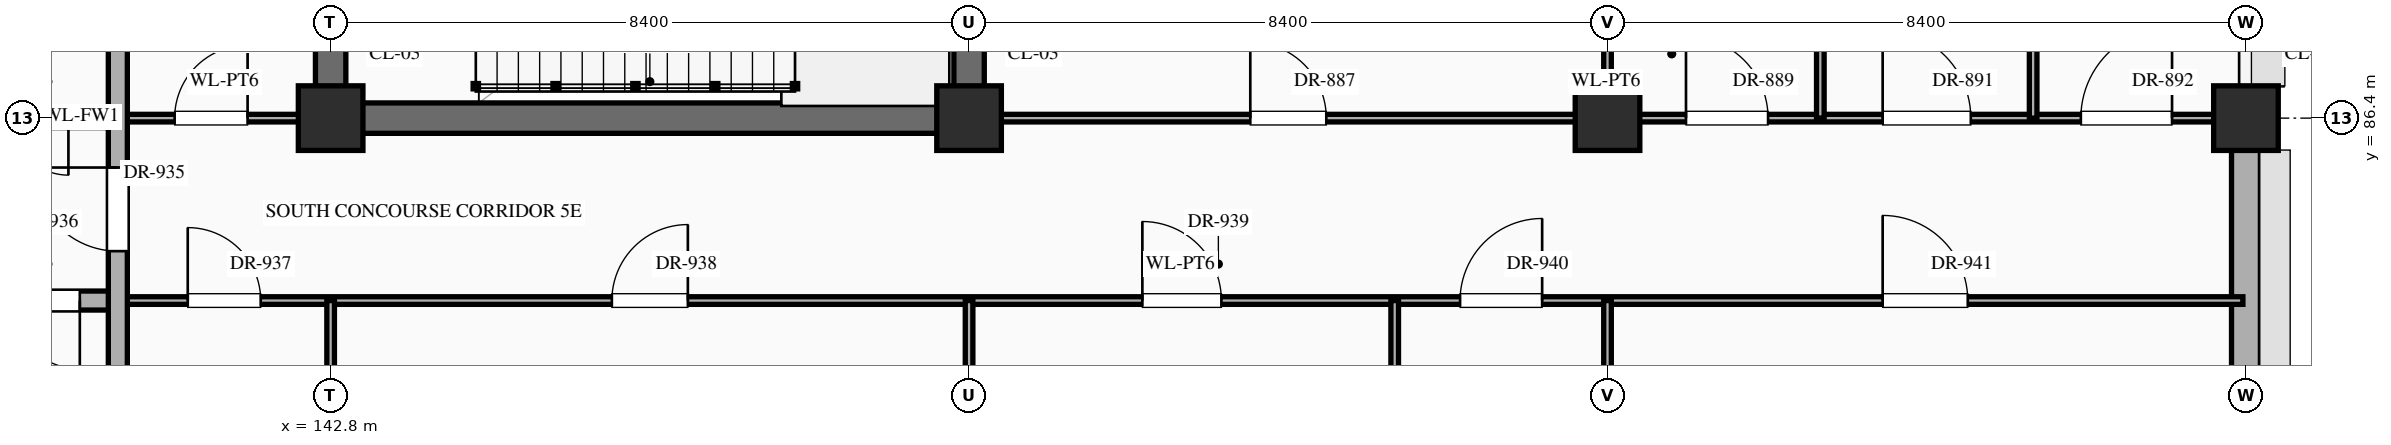
"""IFC4 building model, lengths in metres.
Left out: names, types, materials, properties, quantities, classifications, styles, units other than length and angle.
Written with IfcOpenShell. Run it as: python <this file> out.ifc"""

import sys

from ifc_helpers import new_model, si_unit, direction, frame, frame_2d, origin, origin_2d, place, context, subcontext, project, spatial, rectangle, extrude, element, fill, save


model = new_model("IFC4")
c1 = context("Model", 3, precision=1e-05, world=origin(), true_north=direction((0.0, 1.0)))
c2 = subcontext(c1, "Body", "Model", "MODEL_VIEW")
j1 = project(units=[si_unit("LENGTHUNIT", "METRE"), si_unit("PLANEANGLEUNIT", "RADIAN")], contexts=[c1])
p1 = place(None, origin())
s1 = spatial("IfcSite", under=j1, at=p1, CompositionType="ELEMENT")
p2 = place(p1, origin())
s2 = spatial("IfcBuilding", under=s1, at=p2, CompositionType="ELEMENT")
p3 = place(p2, origin())
s3 = spatial("IfcBuildingStorey", under=s2, at=p3, CompositionType="ELEMENT", Elevation=0.0)
for number, where, z_axis, x_axis in (
    (1, (142.8, 86.4, 0.0), (0.0, 0.0, 1.0), (1.0, 0.0, 0.0)),
    (2, (151.2, 86.4, 0.0), (0.0, 0.0, 1.0), (1.0, 0.0, 0.0)),
    (3, (159.6, 86.4, 0.0), (0.0, 0.0, 1.0), (1.0, 0.0, 0.0)),
    (4, (168.0, 86.4, 0.0), (0.0, 0.0, 1.0), (1.0, 0.0, 0.0)),
):
    element("IfcColumn", number, at=place(p3, frame(where, z_axis=z_axis, x_axis=x_axis)), inside=s3, PredefinedType="COLUMN", context=c2, shape_type="SweptSolid", body=[
        extrude(rectangle(XDim=0.85, YDim=0.85, at=origin_2d()), origin(), (0.0, 0.0, 1.0), 5.4),
    ])
p4 = place(p3, frame((168.0, 79.62, 0.0), z_axis=(0.0, 0.0, 1.0), x_axis=(0.0, 1.0, 0.0)))
e5 = element("IfcWall", 5, at=p4, inside=s3, PredefinedType="STANDARD", context=c2, shape_type="SweptSolid", body=[
    extrude(rectangle(XDim=6.36, YDim=0.38, at=frame_2d((3.18, 0.0))), origin(), (0.0, 0.0, 1.0), 4.47),
])
p5 = place(p4, frame((1.53, 0.0, 0.85)))
e6 = element("IfcOpeningElement", 6, at=p5, cuts=e5, PredefinedType="OPENING", context=c2, shape_type="SweptSolid", body=[
    extrude(rectangle(XDim=0.9, YDim=1.2, at=frame_2d((0.45, 0.6))), frame((0.0, 0.202, 0.0), z_axis=(0.0, -1.0, 0.0), x_axis=(1.0, 0.0, 0.0)), (0.0, 0.0, 1.0), 0.404),
])
p6 = place(p3, frame((137.2, 84.0, 0.0), z_axis=(0.0, 0.0, 1.0), x_axis=(1.0, 0.0, 0.0)))
e7 = element("IfcWall", 7, at=p6, inside=s3, PredefinedType="STANDARD", context=c2, shape_type="SweptSolid", body=[
    extrude(rectangle(XDim=2.8, YDim=0.25, at=frame_2d((1.4, 0.0))), origin(), (0.0, 0.0, 1.0), 5.12),
])
p7 = place(p6, frame((0.5, 0.0, 0.0)))
e8 = element("IfcOpeningElement", 8, at=p7, cuts=e7, PredefinedType="OPENING", context=c2, shape_type="SweptSolid", body=[
    extrude(rectangle(XDim=1.8, YDim=2.35, at=frame_2d((0.9, 1.175))), frame((0.0, 0.137, 0.0), z_axis=(0.0, -1.0, 0.0), x_axis=(1.0, 0.0, 0.0)), (0.0, 0.0, 1.0), 0.274),
])
p8 = place(p3, frame((140.0, 84.0, 0.0), z_axis=(0.0, 0.0, 1.0), x_axis=(1.0, 0.0, 0.0)))
e9 = element("IfcWall", 9, at=p8, inside=s3, PredefinedType="STANDARD", context=c2, shape_type="SweptSolid", body=[
    extrude(rectangle(XDim=27.96, YDim=0.1, at=frame_2d((13.98, 0.0))), origin(), (0.0, 0.0, 1.0), 5.12),
])
p9 = place(p8, frame((0.92, 0.0, 0.0)))
e10 = element("IfcOpeningElement", 10, at=p9, cuts=e9, PredefinedType="OPENING", context=c2, shape_type="SweptSolid", body=[
    extrude(rectangle(XDim=0.96, YDim=2.2, at=frame_2d((0.48, 1.1))), frame((0.0, 0.062, 0.0), z_axis=(0.0, -1.0, 0.0), x_axis=(1.0, 0.0, 0.0)), (0.0, 0.0, 1.0), 0.124),
])
p10 = place(p8, frame((6.5, 0.0, 0.0)))
e11 = element("IfcOpeningElement", 11, at=p10, cuts=e9, PredefinedType="OPENING", context=c2, shape_type="SweptSolid", body=[
    extrude(rectangle(XDim=1.0, YDim=2.25, at=frame_2d((0.5, 1.125))), frame((0.0, 0.062, 0.0), z_axis=(0.0, -1.0, 0.0), x_axis=(1.0, 0.0, 0.0)), (0.0, 0.0, 1.0), 0.124),
])
p11 = place(p8, frame((13.48, 0.0, 0.0)))
e12 = element("IfcOpeningElement", 12, at=p11, cuts=e9, PredefinedType="OPENING", context=c2, shape_type="SweptSolid", body=[
    extrude(rectangle(XDim=1.04, YDim=2.2, at=frame_2d((0.52, 1.1))), frame((0.0, 0.062, 0.0), z_axis=(0.0, -1.0, 0.0), x_axis=(1.0, 0.0, 0.0)), (0.0, 0.0, 1.0), 0.124),
])
p12 = place(p8, frame((17.66, 0.0, 0.0)))
e13 = element("IfcOpeningElement", 13, at=p12, cuts=e9, PredefinedType="OPENING", context=c2, shape_type="SweptSolid", body=[
    extrude(rectangle(XDim=1.08, YDim=2.25, at=frame_2d((0.54, 1.125))), frame((0.0, 0.062, 0.0), z_axis=(0.0, -1.0, 0.0), x_axis=(1.0, 0.0, 0.0)), (0.0, 0.0, 1.0), 0.124),
])
p13 = place(p8, frame((23.22, 0.0, 0.0)))
e14 = element("IfcOpeningElement", 14, at=p13, cuts=e9, PredefinedType="OPENING", context=c2, shape_type="SweptSolid", body=[
    extrude(rectangle(XDim=1.12, YDim=2.25, at=frame_2d((0.56, 1.125))), frame((0.0, 0.062, 0.0), z_axis=(0.0, -1.0, 0.0), x_axis=(1.0, 0.0, 0.0)), (0.0, 0.0, 1.0), 0.124),
])
p14 = place(p3, frame((137.2, 86.4, 0.0), z_axis=(0.0, 0.0, 1.0), x_axis=(1.0, 0.0, 0.0)))
e15 = element("IfcWall", 15, at=p14, inside=s3, PredefinedType="STANDARD", context=c2, shape_type="SweptSolid", body=[
    extrude(rectangle(XDim=2.8, YDim=0.25, at=frame_2d((1.4, 0.0))), origin(), (0.0, 0.0, 1.0), 4.27),
])
p15 = place(p14, frame((0.65, 0.0, 0.0)))
e16 = element("IfcOpeningElement", 16, at=p15, cuts=e15, PredefinedType="OPENING", context=c2, shape_type="SweptSolid", body=[
    extrude(rectangle(XDim=1.5, YDim=2.25, at=frame_2d((0.75, 1.125))), frame((0.0, 0.137, 0.0), z_axis=(0.0, -1.0, 0.0), x_axis=(1.0, 0.0, 0.0)), (0.0, 0.0, 1.0), 0.274),
])
p16 = place(p3, frame((140.0, 86.4, 0.0), z_axis=(0.0, 0.0, 1.0), x_axis=(1.0, 0.0, 0.0)))
e17 = element("IfcWall", 17, at=p16, inside=s3, PredefinedType="STANDARD", context=c2, shape_type="SweptSolid", body=[
    extrude(rectangle(XDim=2.8, YDim=0.1, at=frame_2d((1.4, 0.0))), origin(), (0.0, 0.0, 1.0), 4.27),
])
p17 = place(p16, frame((0.748, 0.0, 0.0)))
e18 = element("IfcOpeningElement", 18, at=p17, cuts=e17, PredefinedType="OPENING", context=c2, shape_type="SweptSolid", body=[
    extrude(rectangle(XDim=0.96, YDim=2.2, at=frame_2d((0.48, 1.1))), frame((0.0, 0.062, 0.0), z_axis=(0.0, -1.0, 0.0), x_axis=(1.0, 0.0, 0.0)), (0.0, 0.0, 1.0), 0.124),
])
p18 = place(p3, frame((142.8, 86.4, 0.0), z_axis=(0.0, 0.0, 1.0), x_axis=(1.0, 0.0, 0.0)))
e19 = element("IfcWall", 19, at=p18, inside=s3, PredefinedType="SHEAR", context=c2, shape_type="SweptSolid", body=[
    extrude(rectangle(XDim=8.4, YDim=0.4, at=frame_2d((4.2, 0.0))), origin(), (0.0, 0.0, 1.0), 5.12),
])
p19 = place(p3, frame((151.2, 86.4, 0.0), z_axis=(0.0, 0.0, 1.0), x_axis=(1.0, 0.0, 0.0)))
e20 = element("IfcWall", 20, at=p19, inside=s3, PredefinedType="STANDARD", context=c2, shape_type="SweptSolid", body=[
    extrude(rectangle(XDim=16.76, YDim=0.1, at=frame_2d((8.38, 0.0))), origin(), (0.0, 0.0, 1.0), 4.27),
])
p20 = place(p19, frame((3.7, 0.0, 0.0)))
e21 = element("IfcOpeningElement", 21, at=p20, cuts=e20, PredefinedType="OPENING", context=c2, shape_type="SweptSolid", body=[
    extrude(rectangle(XDim=1.0, YDim=2.25, at=frame_2d((0.5, 1.125))), frame((0.0, 0.062, 0.0), z_axis=(0.0, -1.0, 0.0), x_axis=(1.0, 0.0, 0.0)), (0.0, 0.0, 1.0), 0.124),
])
p21 = place(p19, frame((9.433, 0.0, 0.0)))
e22 = element("IfcOpeningElement", 22, at=p21, cuts=e20, PredefinedType="OPENING", context=c2, shape_type="SweptSolid", body=[
    extrude(rectangle(XDim=1.08, YDim=2.25, at=frame_2d((0.54, 1.125))), frame((0.0, 0.062, 0.0), z_axis=(0.0, -1.0, 0.0), x_axis=(1.0, 0.0, 0.0)), (0.0, 0.0, 1.0), 0.124),
])
p22 = place(p19, frame((12.02, 0.0, 0.0)))
e23 = element("IfcOpeningElement", 23, at=p22, cuts=e20, PredefinedType="OPENING", context=c2, shape_type="SweptSolid", body=[
    extrude(rectangle(XDim=1.16, YDim=2.3, at=frame_2d((0.58, 1.15))), frame((0.0, 0.062, 0.0), z_axis=(0.0, -1.0, 0.0), x_axis=(1.0, 0.0, 0.0)), (0.0, 0.0, 1.0), 0.124),
])
p23 = place(p19, frame((14.627, 0.0, 0.0)))
e24 = element("IfcOpeningElement", 24, at=p23, cuts=e20, PredefinedType="OPENING", context=c2, shape_type="SweptSolid", body=[
    extrude(rectangle(XDim=1.2, YDim=2.35, at=frame_2d((0.6, 1.175))), frame((0.0, 0.062, 0.0), z_axis=(0.0, -1.0, 0.0), x_axis=(1.0, 0.0, 0.0)), (0.0, 0.0, 1.0), 0.124),
])
p24 = place(p3, frame((140.0, 79.24, 0.0), z_axis=(0.0, 0.0, 1.0), x_axis=(0.0, 1.0, 0.0)))
e25 = element("IfcWall", 25, at=p24, inside=s3, PredefinedType="STANDARD", context=c2, shape_type="SweptSolid", body=[
    extrude(rectangle(XDim=14.36, YDim=0.25, at=frame_2d((7.18, 0.0))), origin(), (0.0, 0.0, 1.0), 5.12),
])
p25 = place(p24, frame((12.61, 0.0, 0.0)))
e26 = element("IfcOpeningElement", 26, at=p25, cuts=e25, PredefinedType="OPENING", context=c2, shape_type="SweptSolid", body=[
    extrude(rectangle(XDim=1.1, YDim=2.2, at=frame_2d((0.55, 1.1))), frame((0.0, 0.137, 0.0), z_axis=(0.0, -1.0, 0.0), x_axis=(1.0, 0.0, 0.0)), (0.0, 0.0, 1.0), 0.274),
])
p26 = place(p24, frame((5.41, 0.0, 0.0)))
e27 = element("IfcOpeningElement", 27, at=p26, cuts=e25, PredefinedType="OPENING", context=c2, shape_type="SweptSolid", body=[
    extrude(rectangle(XDim=1.1, YDim=2.2, at=frame_2d((0.55, 1.1))), frame((0.0, 0.137, 0.0), z_axis=(0.0, -1.0, 0.0), x_axis=(1.0, 0.0, 0.0)), (0.0, 0.0, 1.0), 0.274),
])
p27 = place(p3, frame((142.8, 79.24, 0.0), z_axis=(0.0, 0.0, 1.0), x_axis=(0.0, 1.0, 0.0)))
e28 = element("IfcWall", 28, at=p27, inside=s3, PredefinedType="STANDARD", context=c2, shape_type="SweptSolid", body=[
    extrude(rectangle(XDim=4.76, YDim=0.1, at=frame_2d((2.38, 0.0))), origin(), (0.0, 0.0, 1.0), 4.37),
])
p28 = place(p3, frame((142.8, 86.4, 0.0), z_axis=(0.0, 0.0, 1.0), x_axis=(0.0, 1.0, 0.0)))
e29 = element("IfcWall", 29, at=p28, inside=s3, PredefinedType="SHEAR", context=c2, shape_type="SweptSolid", body=[
    extrude(rectangle(XDim=4.8, YDim=0.4, at=frame_2d((2.4, 0.0))), origin(), (0.0, 0.0, 1.0), 5.12),
])
p29 = place(p3, frame((151.2, 79.24, 0.0), z_axis=(0.0, 0.0, 1.0), x_axis=(0.0, 1.0, 0.0)))
e30 = element("IfcWall", 30, at=p29, inside=s3, PredefinedType="STANDARD", context=c2, shape_type="SweptSolid", body=[
    extrude(rectangle(XDim=4.76, YDim=0.1, at=frame_2d((2.38, 0.0))), origin(), (0.0, 0.0, 1.0), 4.37),
])
p30 = place(p3, frame((151.2, 86.4, 0.0), z_axis=(0.0, 0.0, 1.0), x_axis=(0.0, 1.0, 0.0)))
e31 = element("IfcWall", 31, at=p30, inside=s3, PredefinedType="SHEAR", context=c2, shape_type="SweptSolid", body=[
    extrude(rectangle(XDim=4.8, YDim=0.4, at=frame_2d((2.4, 0.0))), origin(), (0.0, 0.0, 1.0), 5.12),
])
p31 = place(p3, frame((156.8, 57.6, 0.0), z_axis=(0.0, 0.0, 1.0), x_axis=(0.0, 1.0, 0.0)))
e32 = element("IfcWall", 32, at=p31, inside=s3, PredefinedType="STANDARD", context=c2, shape_type="SweptSolid", body=[
    extrude(rectangle(XDim=26.4, YDim=0.1, at=frame_2d((13.2, 0.0))), origin(), (0.0, 0.0, 1.0), 5.12),
])
p32 = place(p31, frame((23.38, 0.0, 0.0)))
e33 = element("IfcOpeningElement", 33, at=p32, cuts=e32, PredefinedType="OPENING", context=c2, shape_type="SweptSolid", body=[
    extrude(rectangle(XDim=1.24, YDim=2.3, at=frame_2d((0.62, 1.15))), frame((0.0, 0.062, 0.0), z_axis=(0.0, -1.0, 0.0), x_axis=(1.0, 0.0, 0.0)), (0.0, 0.0, 1.0), 0.124),
])
p33 = place(p31, frame((3.07, 0.0, 0.0)))
e34 = element("IfcOpeningElement", 34, at=p33, cuts=e32, PredefinedType="OPENING", context=c2, shape_type="SweptSolid", body=[
    extrude(rectangle(XDim=1.06, YDim=2.4, at=frame_2d((0.53, 1.2))), frame((0.0, 0.062, 0.0), z_axis=(0.0, -1.0, 0.0), x_axis=(1.0, 0.0, 0.0)), (0.0, 0.0, 1.0), 0.124),
])
p34 = place(p31, frame((10.23, 0.0, 0.0)))
e35 = element("IfcOpeningElement", 35, at=p34, cuts=e32, PredefinedType="OPENING", context=c2, shape_type="SweptSolid", body=[
    extrude(rectangle(XDim=1.14, YDim=2.4, at=frame_2d((0.57, 1.2))), frame((0.0, 0.062, 0.0), z_axis=(0.0, -1.0, 0.0), x_axis=(1.0, 0.0, 0.0)), (0.0, 0.0, 1.0), 0.124),
])
p35 = place(p31, frame((17.55, 0.0, 0.0)))
e36 = element("IfcOpeningElement", 36, at=p35, cuts=e32, PredefinedType="OPENING", context=c2, shape_type="SweptSolid", body=[
    extrude(rectangle(XDim=0.9, YDim=2.15, at=frame_2d((0.45, 1.075))), frame((0.0, 0.062, 0.0), z_axis=(0.0, -1.0, 0.0), x_axis=(1.0, 0.0, 0.0)), (0.0, 0.0, 1.0), 0.124),
])
p36 = place(p3, frame((159.6, 43.2, 0.0), z_axis=(0.0, 0.0, 1.0), x_axis=(0.0, 1.0, 0.0)))
e37 = element("IfcWall", 37, at=p36, inside=s3, PredefinedType="STANDARD", context=c2, shape_type="SweptSolid", body=[
    extrude(rectangle(XDim=40.8, YDim=0.1, at=frame_2d((20.4, 0.0))), origin(), (0.0, 0.0, 1.0), 4.37),
])
p37 = place(p36, frame((37.933, 0.0, 0.0)))
e38 = element("IfcOpeningElement", 38, at=p37, cuts=e37, PredefinedType="OPENING", context=c2, shape_type="SweptSolid", body=[
    extrude(rectangle(XDim=1.28, YDim=2.35, at=frame_2d((0.64, 1.175))), frame((0.0, 0.062, 0.0), z_axis=(0.0, -1.0, 0.0), x_axis=(1.0, 0.0, 0.0)), (0.0, 0.0, 1.0), 0.124),
])
p38 = place(p36, frame((0.942, 0.0, 0.0)))
e39 = element("IfcOpeningElement", 39, at=p38, cuts=e37, PredefinedType="OPENING", context=c2, shape_type="SweptSolid", body=[
    extrude(rectangle(XDim=0.86, YDim=2.1, at=frame_2d((0.43, 1.05))), frame((0.0, 0.062, 0.0), z_axis=(0.0, -1.0, 0.0), x_axis=(1.0, 0.0, 0.0)), (0.0, 0.0, 1.0), 0.124),
])
p39 = place(p36, frame((4.167, 0.0, 0.0)))
e40 = element("IfcOpeningElement", 40, at=p39, cuts=e37, PredefinedType="OPENING", context=c2, shape_type="SweptSolid", body=[
    extrude(rectangle(XDim=0.92, YDim=2.15, at=frame_2d((0.46, 1.075))), frame((0.0, 0.062, 0.0), z_axis=(0.0, -1.0, 0.0), x_axis=(1.0, 0.0, 0.0)), (0.0, 0.0, 1.0), 0.124),
])
p40 = place(p36, frame((10.32, 0.0, 0.0)))
e41 = element("IfcOpeningElement", 41, at=p40, cuts=e37, PredefinedType="OPENING", context=c2, shape_type="SweptSolid", body=[
    extrude(rectangle(XDim=0.96, YDim=2.2, at=frame_2d((0.48, 1.1))), frame((0.0, 0.062, 0.0), z_axis=(0.0, -1.0, 0.0), x_axis=(1.0, 0.0, 0.0)), (0.0, 0.0, 1.0), 0.124),
])
p41 = place(p36, frame((17.5, 0.0, 0.0)))
e42 = element("IfcOpeningElement", 42, at=p41, cuts=e37, PredefinedType="OPENING", context=c2, shape_type="SweptSolid", body=[
    extrude(rectangle(XDim=1.0, YDim=2.25, at=frame_2d((0.5, 1.125))), frame((0.0, 0.062, 0.0), z_axis=(0.0, -1.0, 0.0), x_axis=(1.0, 0.0, 0.0)), (0.0, 0.0, 1.0), 0.124),
])
p42 = place(p36, frame((24.68, 0.0, 0.0)))
e43 = element("IfcOpeningElement", 43, at=p42, cuts=e37, PredefinedType="OPENING", context=c2, shape_type="SweptSolid", body=[
    extrude(rectangle(XDim=1.04, YDim=2.2, at=frame_2d((0.52, 1.1))), frame((0.0, 0.062, 0.0), z_axis=(0.0, -1.0, 0.0), x_axis=(1.0, 0.0, 0.0)), (0.0, 0.0, 1.0), 0.124),
])
p43 = place(p36, frame((31.86, 0.0, 0.0)))
e44 = element("IfcOpeningElement", 44, at=p43, cuts=e37, PredefinedType="OPENING", context=c2, shape_type="SweptSolid", body=[
    extrude(rectangle(XDim=1.08, YDim=2.25, at=frame_2d((0.54, 1.125))), frame((0.0, 0.062, 0.0), z_axis=(0.0, -1.0, 0.0), x_axis=(1.0, 0.0, 0.0)), (0.0, 0.0, 1.0), 0.124),
])
p44 = place(p3, frame((159.6, 86.4, 0.0), z_axis=(0.0, 0.0, 1.0), x_axis=(0.0, 1.0, 0.0)))
e45 = element("IfcWall", 45, at=p44, inside=s3, PredefinedType="STANDARD", context=c2, shape_type="SweptSolid", body=[
    extrude(rectangle(XDim=7.2, YDim=0.1, at=frame_2d((3.6, 0.0))), origin(), (0.0, 0.0, 1.0), 4.37),
])
p45 = place(p3, frame((162.4, 86.4, 0.0), z_axis=(0.0, 0.0, 1.0), x_axis=(0.0, 1.0, 0.0)))
e46 = element("IfcWall", 46, at=p45, inside=s3, PredefinedType="STANDARD", context=c2, shape_type="SweptSolid", body=[
    extrude(rectangle(XDim=7.2, YDim=0.1, at=frame_2d((3.6, 0.0))), origin(), (0.0, 0.0, 1.0), 5.12),
])
p46 = place(p45, frame((3.08, 0.0, 0.0)))
e47 = element("IfcOpeningElement", 47, at=p46, cuts=e46, PredefinedType="OPENING", context=c2, shape_type="SweptSolid", body=[
    extrude(rectangle(XDim=1.04, YDim=2.2, at=frame_2d((0.52, 1.1))), frame((0.0, 0.062, 0.0), z_axis=(0.0, -1.0, 0.0), x_axis=(1.0, 0.0, 0.0)), (0.0, 0.0, 1.0), 0.124),
])
p47 = place(p3, frame((165.2, 86.4, 0.0), z_axis=(0.0, 0.0, 1.0), x_axis=(0.0, 1.0, 0.0)))
e48 = element("IfcWall", 48, at=p47, inside=s3, PredefinedType="STANDARD", context=c2, shape_type="SweptSolid", body=[
    extrude(rectangle(XDim=7.2, YDim=0.1, at=frame_2d((3.6, 0.0))), origin(), (0.0, 0.0, 1.0), 5.12),
])
p48 = place(p47, frame((3.04, 0.0, 0.0)))
e49 = element("IfcOpeningElement", 49, at=p48, cuts=e48, PredefinedType="OPENING", context=c2, shape_type="SweptSolid", body=[
    extrude(rectangle(XDim=1.12, YDim=2.25, at=frame_2d((0.56, 1.125))), frame((0.0, 0.062, 0.0), z_axis=(0.0, -1.0, 0.0), x_axis=(1.0, 0.0, 0.0)), (0.0, 0.0, 1.0), 0.124),
])
p49 = place(p15, frame((1.5, 0.0, 0.0), z_axis=(0.0, 0.0, 1.0), x_axis=(-1.0, 0.0, 0.0)))
e50 = element("IfcDoor", 50, at=p49, inside=s3, OperationType="DOUBLE_DOOR_SINGLE_SWING", PredefinedType="DOOR", context=c2, shape_type="SweptSolid", body=[
    extrude(rectangle(XDim=1.5, YDim=2.25, at=frame_2d((0.75, 1.125))), frame((0.0, 0.025, 0.0), z_axis=(0.0, -1.0, 0.0), x_axis=(1.0, 0.0, 0.0)), (0.0, 0.0, 1.0), 0.05),
])
fill(e16, e50)
p50 = place(p17, origin())
e51 = element("IfcDoor", 51, at=p50, inside=s3, OperationType="SINGLE_SWING_RIGHT", PredefinedType="DOOR", context=c2, shape_type="SweptSolid", body=[
    extrude(rectangle(XDim=0.96, YDim=2.2, at=frame_2d((0.48, 1.1))), frame((0.0, 0.025, 0.0), z_axis=(0.0, -1.0, 0.0), x_axis=(1.0, 0.0, 0.0)), (0.0, 0.0, 1.0), 0.05),
])
fill(e18, e51)
p51 = place(p20, origin())
e52 = element("IfcDoor", 52, at=p51, inside=s3, OperationType="SINGLE_SWING_LEFT", PredefinedType="DOOR", context=c2, shape_type="SweptSolid", body=[
    extrude(rectangle(XDim=1.0, YDim=2.25, at=frame_2d((0.5, 1.125))), frame((0.0, 0.025, 0.0), z_axis=(0.0, -1.0, 0.0), x_axis=(1.0, 0.0, 0.0)), (0.0, 0.0, 1.0), 0.05),
])
fill(e21, e52)
p52 = place(p21, origin())
e53 = element("IfcDoor", 53, at=p52, inside=s3, OperationType="SINGLE_SWING_LEFT", PredefinedType="DOOR", context=c2, shape_type="SweptSolid", body=[
    extrude(rectangle(XDim=1.08, YDim=2.25, at=frame_2d((0.54, 1.125))), frame((0.0, 0.025, 0.0), z_axis=(0.0, -1.0, 0.0), x_axis=(1.0, 0.0, 0.0)), (0.0, 0.0, 1.0), 0.05),
])
fill(e22, e53)
p53 = place(p22, origin())
e54 = element("IfcDoor", 54, at=p53, inside=s3, OperationType="SINGLE_SWING_LEFT", PredefinedType="DOOR", context=c2, shape_type="SweptSolid", body=[
    extrude(rectangle(XDim=1.16, YDim=2.3, at=frame_2d((0.58, 1.15))), frame((0.0, 0.025, 0.0), z_axis=(0.0, -1.0, 0.0), x_axis=(1.0, 0.0, 0.0)), (0.0, 0.0, 1.0), 0.05),
])
fill(e23, e54)
p54 = place(p23, origin())
e55 = element("IfcDoor", 55, at=p54, inside=s3, OperationType="SINGLE_SWING_RIGHT", PredefinedType="DOOR", context=c2, shape_type="SweptSolid", body=[
    extrude(rectangle(XDim=1.2, YDim=2.35, at=frame_2d((0.6, 1.175))), frame((0.0, 0.025, 0.0), z_axis=(0.0, -1.0, 0.0), x_axis=(1.0, 0.0, 0.0)), (0.0, 0.0, 1.0), 0.05),
])
fill(e24, e55)
p55 = place(p26, origin())
e56 = element("IfcDoor", 56, at=p55, inside=s3, OperationType="SINGLE_SWING_RIGHT", PredefinedType="DOOR", context=c2, shape_type="SweptSolid", body=[
    extrude(rectangle(XDim=1.1, YDim=2.2, at=frame_2d((0.55, 1.1))), frame((0.0, 0.025, 0.0), z_axis=(0.0, -1.0, 0.0), x_axis=(1.0, 0.0, 0.0)), (0.0, 0.0, 1.0), 0.05),
])
fill(e27, e56)
p56 = place(p7, frame((1.8, 0.0, 0.0), z_axis=(0.0, 0.0, 1.0), x_axis=(-1.0, 0.0, 0.0)))
e57 = element("IfcDoor", 57, at=p56, inside=s3, OperationType="DOUBLE_DOOR_SINGLE_SWING", PredefinedType="DOOR", context=c2, shape_type="SweptSolid", body=[
    extrude(rectangle(XDim=1.8, YDim=2.35, at=frame_2d((0.9, 1.175))), frame((0.0, 0.025, 0.0), z_axis=(0.0, -1.0, 0.0), x_axis=(1.0, 0.0, 0.0)), (0.0, 0.0, 1.0), 0.05),
])
fill(e8, e57)
p57 = place(p9, origin())
e58 = element("IfcDoor", 58, at=p57, inside=s3, OperationType="SINGLE_SWING_LEFT", PredefinedType="DOOR", context=c2, shape_type="SweptSolid", body=[
    extrude(rectangle(XDim=0.96, YDim=2.2, at=frame_2d((0.48, 1.1))), frame((0.0, 0.025, 0.0), z_axis=(0.0, -1.0, 0.0), x_axis=(1.0, 0.0, 0.0)), (0.0, 0.0, 1.0), 0.05),
])
fill(e10, e58)
p58 = place(p10, origin())
e59 = element("IfcDoor", 59, at=p58, inside=s3, OperationType="SINGLE_SWING_RIGHT", PredefinedType="DOOR", context=c2, shape_type="SweptSolid", body=[
    extrude(rectangle(XDim=1.0, YDim=2.25, at=frame_2d((0.5, 1.125))), frame((0.0, 0.025, 0.0), z_axis=(0.0, -1.0, 0.0), x_axis=(1.0, 0.0, 0.0)), (0.0, 0.0, 1.0), 0.05),
])
fill(e11, e59)
p59 = place(p11, origin())
e60 = element("IfcDoor", 60, at=p59, inside=s3, OperationType="SINGLE_SWING_LEFT", PredefinedType="DOOR", context=c2, shape_type="SweptSolid", body=[
    extrude(rectangle(XDim=1.04, YDim=2.2, at=frame_2d((0.52, 1.1))), frame((0.0, 0.025, 0.0), z_axis=(0.0, -1.0, 0.0), x_axis=(1.0, 0.0, 0.0)), (0.0, 0.0, 1.0), 0.05),
])
fill(e12, e60)
p60 = place(p12, origin())
e61 = element("IfcDoor", 61, at=p60, inside=s3, OperationType="SINGLE_SWING_RIGHT", PredefinedType="DOOR", context=c2, shape_type="SweptSolid", body=[
    extrude(rectangle(XDim=1.08, YDim=2.25, at=frame_2d((0.54, 1.125))), frame((0.0, 0.025, 0.0), z_axis=(0.0, -1.0, 0.0), x_axis=(1.0, 0.0, 0.0)), (0.0, 0.0, 1.0), 0.05),
])
fill(e13, e61)
p61 = place(p13, origin())
e62 = element("IfcDoor", 62, at=p61, inside=s3, OperationType="SINGLE_SWING_LEFT", PredefinedType="DOOR", context=c2, shape_type="SweptSolid", body=[
    extrude(rectangle(XDim=1.12, YDim=2.25, at=frame_2d((0.56, 1.125))), frame((0.0, 0.025, 0.0), z_axis=(0.0, -1.0, 0.0), x_axis=(1.0, 0.0, 0.0)), (0.0, 0.0, 1.0), 0.05),
])
fill(e14, e62)
save(model, sys.argv[1])
